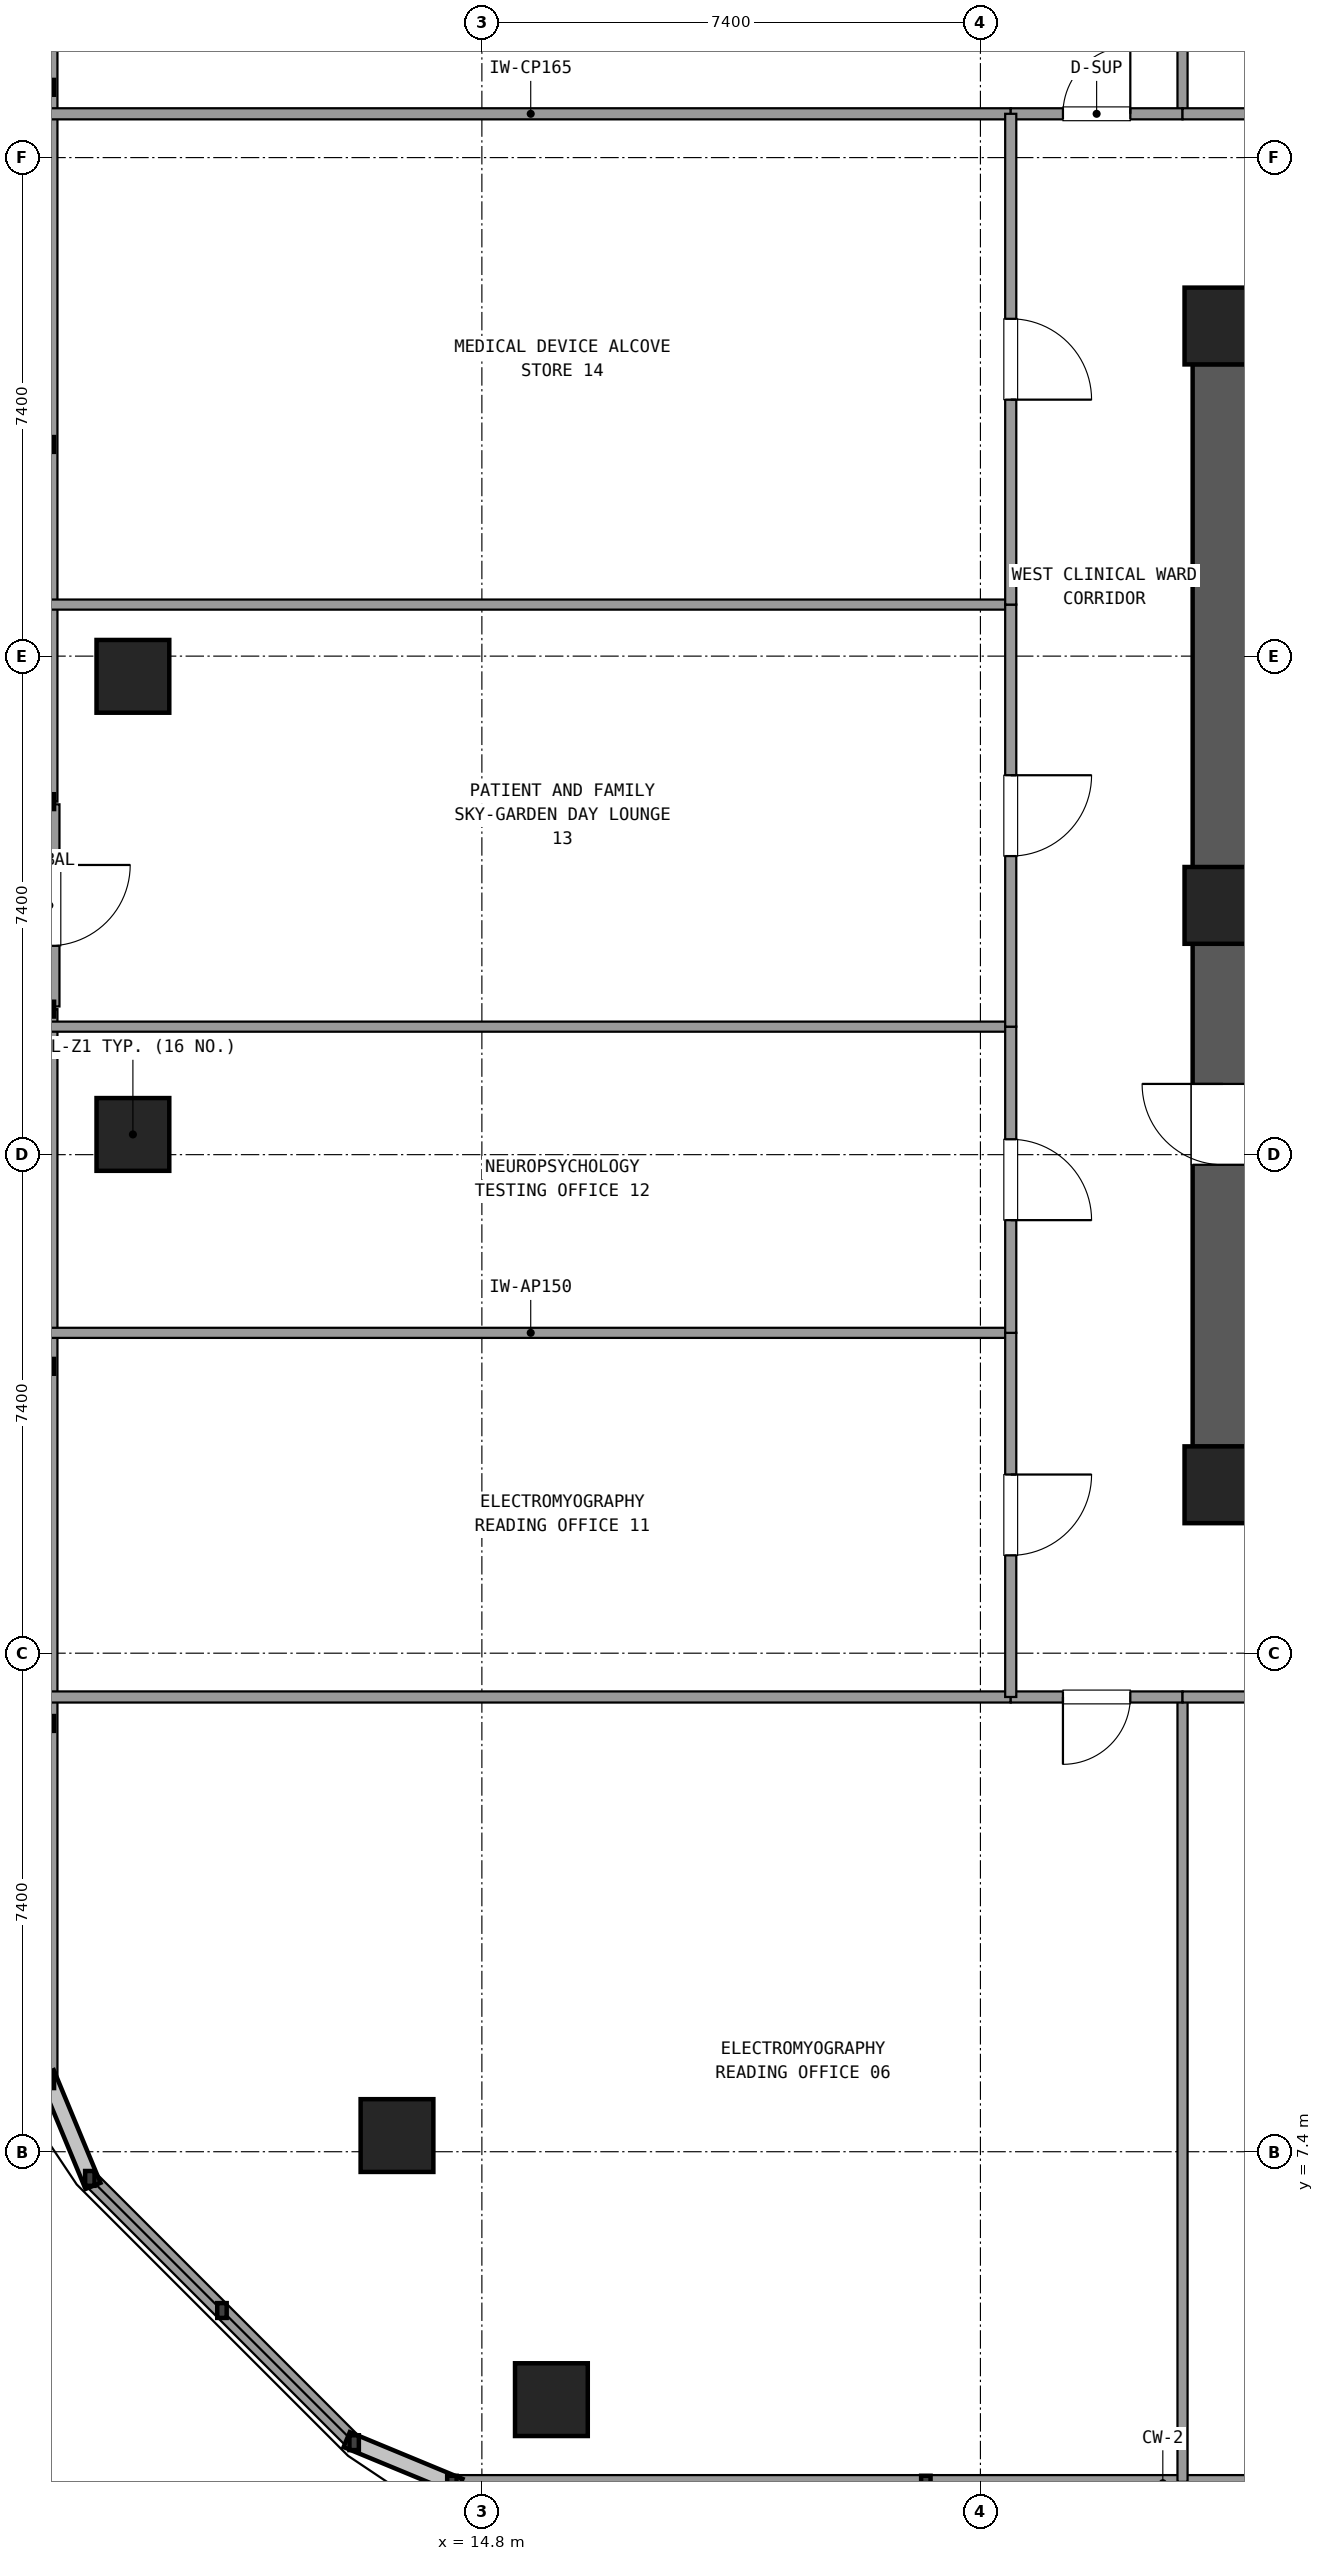
"""IFC4 building model, lengths in metres.
Left out: names, types, materials, properties, quantities, classifications, styles, units other than length and angle.
Written with IfcOpenShell. Run it as: python <this file> out.ifc"""

import sys

from ifc_helpers import new_model, si_unit, direction, frame, frame_2d, origin, origin_2d, place, context, subcontext, project, spatial, rectangle, extrude, element, fill, save


model = new_model("IFC4")
c1 = context("Model", 3, precision=1e-05, world=origin(), true_north=direction((0.0, 1.0)))
c2 = subcontext(c1, "Body", "Model", "MODEL_VIEW")
j1 = project(units=[si_unit("LENGTHUNIT", "METRE"), si_unit("PLANEANGLEUNIT", "RADIAN")], contexts=[c1])
p1 = place(None, origin())
s1 = spatial("IfcSite", under=j1, at=p1, CompositionType="ELEMENT")
p2 = place(p1, origin())
s2 = spatial("IfcBuilding", under=s1, at=p2, CompositionType="ELEMENT")
p3 = place(p2, frame((0.0, 0.0, 63.54)))
s3 = spatial("IfcBuildingStorey", under=s2, at=p3, CompositionType="ELEMENT", Elevation=63.54)
for number, where, z_axis, x_axis in (
    (1, (25.8, 17.3, 0.0), (0.0, 0.0, 1.0), (1.0, 0.0, 0.0)),
    (2, (25.8, 34.5, 0.0), (0.0, 0.0, 1.0), (1.0, 0.0, 0.0)),
    (3, (25.8, 25.9, 0.0), (0.0, 0.0, 1.0), (1.0, 0.0, 0.0)),
):
    element("IfcColumn", number, at=place(p3, frame(where, z_axis=z_axis, x_axis=x_axis)), inside=s3, PredefinedType="COLUMN", context=c2, shape_type="SweptSolid", body=[
        extrude(rectangle(XDim=1.14, YDim=1.14, at=origin_2d()), origin(), (0.0, 0.0, 1.0), 3.6),
    ])
p4 = place(p3, frame((25.8, 33.935, 0.0), z_axis=(0.0, 0.0, 1.0), x_axis=(0.0, -1.0, 0.0)))
e4 = element("IfcWall", 4, at=p4, inside=s3, PredefinedType="SHEAR", context=c2, shape_type="SweptSolid", body=[
    extrude(rectangle(XDim=7.47, YDim=0.9, at=frame_2d((3.735, 0.0))), origin(), (0.0, 0.0, 1.0), 3.32),
])
p5 = place(p3, frame((25.8, 25.335, 0.0), z_axis=(0.0, 0.0, 1.0), x_axis=(0.0, -1.0, 0.0)))
e5 = element("IfcWall", 5, at=p5, inside=s3, PredefinedType="SHEAR", context=c2, shape_type="SweptSolid", body=[
    extrude(rectangle(XDim=7.47, YDim=0.9, at=frame_2d((3.735, 0.0))), origin(), (0.0, 0.0, 1.0), 3.32),
])
p6 = place(p5, frame((2.085, 0.0, 0.0)))
e6 = element("IfcOpeningElement", 6, at=p6, cuts=e5, PredefinedType="OPENING", context=c2, shape_type="SweptSolid", body=[
    extrude(rectangle(XDim=1.2, YDim=2.15, at=frame_2d((0.6, 1.075))), frame((0.0, 0.46, 0.0), z_axis=(0.0, -1.0, 0.0), x_axis=(1.0, 0.0, 0.0)), (0.0, 0.0, 1.0), 0.92),
])
for number, where, z_axis, x_axis in (
    (7, (9.62, 22.5, 0.0), (0.0, 0.0, 1.0), (1.0, 0.0, 0.0)),
    (8, (13.54, 7.64, 0.0), (0.0, 0.0, 1.0), (1.0, 0.0, 0.0)),
    (9, (15.832, 3.72, 0.0), (0.0, 0.0, 1.0), (1.0, 0.0, 0.0)),
    (10, (9.62, 29.3, 0.0), (0.0, 0.0, 1.0), (1.0, 0.0, 0.0)),
):
    element("IfcColumn", number, at=place(p3, frame(where, z_axis=z_axis, x_axis=x_axis)), inside=s3, PredefinedType="COLUMN", context=c2, shape_type="SweptSolid", body=[
        extrude(rectangle(XDim=1.08, YDim=1.08, at=origin_2d()), origin(), (0.0, 0.0, 1.0), 3.6),
    ])
p7 = place(p3, frame((14.355, 2.48, 0.0), z_axis=(0.0, 0.0, 1.0), x_axis=(1.0, 0.0, 0.0)))
e11 = element("IfcWall", 11, at=p7, inside=s3, PredefinedType="SOLIDWALL", context=c2, shape_type="SweptSolid", body=[
    extrude(rectangle(XDim=21.105, YDim=0.24, at=frame_2d((10.552, 0.0))), origin(), (0.0, 0.0, 1.0), 0.85),
])
p8 = place(p3, frame((8.38, 27.4, 0.0), z_axis=(0.0, 0.0, 1.0), x_axis=(0.0, -1.0, 0.0)))
e12 = element("IfcWall", 12, at=p8, inside=s3, PredefinedType="SOLIDWALL", context=c2, shape_type="SweptSolid", body=[
    extrude(rectangle(XDim=3.0, YDim=0.3, at=frame_2d((1.5, 0.0))), origin(), (0.0, 0.0, 1.0), 2.65),
])
p9 = place(p8, frame((0.9, 0.0, 0.0)))
e13 = element("IfcOpeningElement", 13, at=p9, cuts=e12, PredefinedType="OPENING", context=c2, shape_type="SweptSolid", body=[
    extrude(rectangle(XDim=1.2, YDim=2.2, at=frame_2d((0.6, 1.1))), frame((0.0, 0.16, 0.0), z_axis=(0.0, -1.0, 0.0), x_axis=(1.0, 0.0, 0.0)), (0.0, 0.0, 1.0), 0.32),
])
for number, where, z_axis, x_axis in (
    (14, (8.38, 43.345, 0.0), (0.0, 0.0, 1.0), (0.0, -1.0, 0.0)),
    (15, (8.38, 24.36, 0.0), (0.0, 0.0, 1.0), (0.0, -1.0, 0.0)),
):
    element("IfcWall", number, at=place(p3, frame(where, z_axis=z_axis, x_axis=x_axis)), inside=s3, PredefinedType="SOLIDWALL", context=c2, shape_type="SweptSolid", body=[
        extrude(rectangle(XDim=15.905, YDim=0.24, at=frame_2d((7.953, 0.0))), origin(), (0.0, 0.0, 1.0), 0.85),
    ])
p10 = place(p3, frame((8.981, 7.004, 0.0), z_axis=(0.0, 0.0, 1.0), x_axis=(0.707128783731, -0.707084777957, 0.0)))
e16 = element("IfcWall", 16, at=p10, inside=s3, PredefinedType="SOLIDWALL", context=c2, shape_type="SweptSolid", body=[
    extrude(rectangle(XDim=5.548, YDim=0.24, at=frame_2d((2.774, 0.0))), origin(), (0.0, 0.0, 1.0), 0.85),
])
for number, where, z_axis, x_axis in (
    (17, (8.4, 37.65, 0.0), (0.0, 0.0, 1.0), (1.0, 0.0, 0.0)),
    (18, (8.4, 14.15, 0.0), (0.0, 0.0, 1.0), (1.0, 0.0, 0.0)),
):
    element("IfcWall", number, at=place(p3, frame(where, z_axis=z_axis, x_axis=x_axis)), inside=s3, PredefinedType="PARTITIONING", context=c2, shape_type="SweptSolid", body=[
        extrude(rectangle(XDim=14.25, YDim=0.165, at=frame_2d((7.125, 0.0))), origin(), (0.0, 0.0, 1.0), 2.61),
    ])
p11 = place(p3, frame((25.2, 37.65, 0.0), z_axis=(0.0, 0.0, 1.0), x_axis=(0.0, 1.0, 0.0)))
e19 = element("IfcWall", 19, at=p11, inside=s3, PredefinedType="PARTITIONING", context=c2, shape_type="SweptSolid", body=[
    extrude(rectangle(XDim=11.65, YDim=0.15, at=frame_2d((5.825, 0.0))), origin(), (0.0, 0.0, 1.0), 2.61),
])
p12 = place(p3, frame((22.65, 37.65, 0.0), z_axis=(0.0, 0.0, 1.0), x_axis=(1.0, 0.0, 0.0)))
e20 = element("IfcWall", 20, at=p12, inside=s3, PredefinedType="PARTITIONING", context=c2, shape_type="SweptSolid", body=[
    extrude(rectangle(XDim=2.55, YDim=0.165, at=frame_2d((1.275, 0.0))), origin(), (0.0, 0.0, 1.0), 2.61),
])
p13 = place(p12, frame((0.775, 0.0, 0.0)))
e21 = element("IfcOpeningElement", 21, at=p13, cuts=e20, PredefinedType="OPENING", context=c2, shape_type="SweptSolid", body=[
    extrude(rectangle(XDim=1.0, YDim=2.15, at=frame_2d((0.5, 1.075))), frame((0.0, 0.093, 0.0), z_axis=(0.0, -1.0, 0.0), x_axis=(1.0, 0.0, 0.0)), (0.0, 0.0, 1.0), 0.185),
])
p14 = place(p3, frame((25.2, 37.65, 0.0), z_axis=(0.0, 0.0, 1.0), x_axis=(1.0, 0.0, 0.0)))
e22 = element("IfcWall", 22, at=p14, inside=s3, PredefinedType="PARTITIONING", context=c2, shape_type="SweptSolid", body=[
    extrude(rectangle(XDim=7.751, YDim=0.165, at=frame_2d((3.875, 0.0))), origin(), (0.0, 0.0, 1.0), 2.61),
])
p15 = place(p14, frame((3.276, 0.0, 0.0)))
e23 = element("IfcOpeningElement", 23, at=p15, cuts=e22, PredefinedType="OPENING", context=c2, shape_type="SweptSolid", body=[
    extrude(rectangle(XDim=1.2, YDim=2.15, at=frame_2d((0.6, 1.075))), frame((0.0, 0.093, 0.0), z_axis=(0.0, -1.0, 0.0), x_axis=(1.0, 0.0, 0.0)), (0.0, 0.0, 1.0), 0.185),
])
p16 = place(p3, frame((25.2, 14.15, 0.0), z_axis=(0.0, 0.0, 1.0), x_axis=(0.0, -1.0, 0.0)))
e24 = element("IfcWall", 24, at=p16, inside=s3, PredefinedType="PARTITIONING", context=c2, shape_type="SweptSolid", body=[
    extrude(rectangle(XDim=11.65, YDim=0.15, at=frame_2d((5.825, 0.0))), origin(), (0.0, 0.0, 1.0), 2.61),
])
p17 = place(p3, frame((22.65, 14.15, 0.0), z_axis=(0.0, 0.0, 1.0), x_axis=(1.0, 0.0, 0.0)))
e25 = element("IfcWall", 25, at=p17, inside=s3, PredefinedType="PARTITIONING", context=c2, shape_type="SweptSolid", body=[
    extrude(rectangle(XDim=2.55, YDim=0.165, at=frame_2d((1.275, 0.0))), origin(), (0.0, 0.0, 1.0), 2.61),
])
p18 = place(p17, frame((0.775, 0.0, 0.0)))
e26 = element("IfcOpeningElement", 26, at=p18, cuts=e25, PredefinedType="OPENING", context=c2, shape_type="SweptSolid", body=[
    extrude(rectangle(XDim=1.0, YDim=2.15, at=frame_2d((0.5, 1.075))), frame((0.0, 0.093, 0.0), z_axis=(0.0, -1.0, 0.0), x_axis=(1.0, 0.0, 0.0)), (0.0, 0.0, 1.0), 0.185),
])
p19 = place(p3, frame((25.2, 14.15, 0.0), z_axis=(0.0, 0.0, 1.0), x_axis=(1.0, 0.0, 0.0)))
e27 = element("IfcWall", 27, at=p19, inside=s3, PredefinedType="PARTITIONING", context=c2, shape_type="SweptSolid", body=[
    extrude(rectangle(XDim=6.284, YDim=0.165, at=frame_2d((3.142, 0.0))), origin(), (0.0, 0.0, 1.0), 2.61),
])
p20 = place(p19, frame((2.542, 0.0, 0.0)))
e28 = element("IfcOpeningElement", 28, at=p20, cuts=e27, PredefinedType="OPENING", context=c2, shape_type="SweptSolid", body=[
    extrude(rectangle(XDim=1.2, YDim=2.15, at=frame_2d((0.6, 1.075))), frame((0.0, 0.093, 0.0), z_axis=(0.0, -1.0, 0.0), x_axis=(1.0, 0.0, 0.0)), (0.0, 0.0, 1.0), 0.185),
])
p21 = place(p3, frame((22.65, 19.555, 0.0), z_axis=(0.0, 0.0, 1.0), x_axis=(-1.0, 0.0, 0.0)))
e29 = element("IfcWall", 29, at=p21, inside=s3, PredefinedType="PARTITIONING", context=c2, shape_type="SweptSolid", body=[
    extrude(rectangle(XDim=14.25, YDim=0.15, at=frame_2d((7.125, 0.0))), origin(), (0.0, 0.0, 1.0), 2.61),
])
p22 = place(p3, frame((22.65, 14.15, 0.0), z_axis=(0.0, 0.0, 1.0), x_axis=(0.0, 1.0, 0.0)))
e30 = element("IfcWall", 30, at=p22, inside=s3, PredefinedType="PARTITIONING", context=c2, shape_type="SweptSolid", body=[
    extrude(rectangle(XDim=5.405, YDim=0.165, at=frame_2d((2.703, 0.0))), origin(), (0.0, 0.0, 1.0), 2.61),
])
p23 = place(p22, frame((2.102, 0.0, 0.0)))
e31 = element("IfcOpeningElement", 31, at=p23, cuts=e30, PredefinedType="OPENING", context=c2, shape_type="SweptSolid", body=[
    extrude(rectangle(XDim=1.2, YDim=2.15, at=frame_2d((0.6, 1.075))), frame((0.0, 0.093, 0.0), z_axis=(0.0, -1.0, 0.0), x_axis=(1.0, 0.0, 0.0)), (0.0, 0.0, 1.0), 0.185),
])
p24 = place(p3, frame((22.65, 24.1, 0.0), z_axis=(0.0, 0.0, 1.0), x_axis=(-1.0, 0.0, 0.0)))
e32 = element("IfcWall", 32, at=p24, inside=s3, PredefinedType="PARTITIONING", context=c2, shape_type="SweptSolid", body=[
    extrude(rectangle(XDim=14.25, YDim=0.15, at=frame_2d((7.125, 0.0))), origin(), (0.0, 0.0, 1.0), 2.61),
])
p25 = place(p3, frame((22.65, 19.555, 0.0), z_axis=(0.0, 0.0, 1.0), x_axis=(0.0, 1.0, 0.0)))
e33 = element("IfcWall", 33, at=p25, inside=s3, PredefinedType="PARTITIONING", context=c2, shape_type="SweptSolid", body=[
    extrude(rectangle(XDim=4.545, YDim=0.165, at=frame_2d((2.272, 0.0))), origin(), (0.0, 0.0, 1.0), 2.61),
])
p26 = place(p25, frame((1.673, 0.0, 0.0)))
e34 = element("IfcOpeningElement", 34, at=p26, cuts=e33, PredefinedType="OPENING", context=c2, shape_type="SweptSolid", body=[
    extrude(rectangle(XDim=1.2, YDim=2.15, at=frame_2d((0.6, 1.075))), frame((0.0, 0.093, 0.0), z_axis=(0.0, -1.0, 0.0), x_axis=(1.0, 0.0, 0.0)), (0.0, 0.0, 1.0), 0.185),
])
p27 = place(p3, frame((22.65, 30.365, 0.0), z_axis=(0.0, 0.0, 1.0), x_axis=(-1.0, 0.0, 0.0)))
e35 = element("IfcWall", 35, at=p27, inside=s3, PredefinedType="PARTITIONING", context=c2, shape_type="SweptSolid", body=[
    extrude(rectangle(XDim=14.25, YDim=0.15, at=frame_2d((7.125, 0.0))), origin(), (0.0, 0.0, 1.0), 2.61),
])
p28 = place(p3, frame((22.65, 24.1, 0.0), z_axis=(0.0, 0.0, 1.0), x_axis=(0.0, 1.0, 0.0)))
e36 = element("IfcWall", 36, at=p28, inside=s3, PredefinedType="PARTITIONING", context=c2, shape_type="SweptSolid", body=[
    extrude(rectangle(XDim=6.265, YDim=0.165, at=frame_2d((3.132, 0.0))), origin(), (0.0, 0.0, 1.0), 2.61),
])
p29 = place(p28, frame((2.532, 0.0, 0.0)))
e37 = element("IfcOpeningElement", 37, at=p29, cuts=e36, PredefinedType="OPENING", context=c2, shape_type="SweptSolid", body=[
    extrude(rectangle(XDim=1.2, YDim=2.15, at=frame_2d((0.6, 1.075))), frame((0.0, 0.093, 0.0), z_axis=(0.0, -1.0, 0.0), x_axis=(1.0, 0.0, 0.0)), (0.0, 0.0, 1.0), 0.185),
])
p30 = place(p3, frame((22.65, 30.365, 0.0), z_axis=(0.0, 0.0, 1.0), x_axis=(0.0, 1.0, 0.0)))
e38 = element("IfcWall", 38, at=p30, inside=s3, PredefinedType="PARTITIONING", context=c2, shape_type="SweptSolid", body=[
    extrude(rectangle(XDim=7.285, YDim=0.165, at=frame_2d((3.643, 0.0))), origin(), (0.0, 0.0, 1.0), 2.61),
])
p31 = place(p30, frame((3.042, 0.0, 0.0)))
e39 = element("IfcOpeningElement", 39, at=p31, cuts=e38, PredefinedType="OPENING", context=c2, shape_type="SweptSolid", body=[
    extrude(rectangle(XDim=1.2, YDim=2.15, at=frame_2d((0.6, 1.075))), frame((0.0, 0.093, 0.0), z_axis=(0.0, -1.0, 0.0), x_axis=(1.0, 0.0, 0.0)), (0.0, 0.0, 1.0), 0.185),
])
p32 = place(p6, frame((1.2, 0.0, 0.0), z_axis=(0.0, 0.0, 1.0), x_axis=(-1.0, 0.0, 0.0)))
e40 = element("IfcDoor", 40, at=p32, inside=s3, OperationType="SINGLE_SWING_LEFT", PredefinedType="DOOR", context=c2, shape_type="SweptSolid", body=[
    extrude(rectangle(XDim=1.2, YDim=2.15, at=frame_2d((0.6, 1.075))), frame((0.0, 0.025, 0.0), z_axis=(0.0, -1.0, 0.0), x_axis=(1.0, 0.0, 0.0)), (0.0, 0.0, 1.0), 0.05),
])
fill(e6, e40)
p33 = place(p13, origin())
e41 = element("IfcDoor", 41, at=p33, inside=s3, OperationType="SINGLE_SWING_RIGHT", PredefinedType="DOOR", context=c2, shape_type="SweptSolid", body=[
    extrude(rectangle(XDim=1.0, YDim=2.15, at=frame_2d((0.5, 1.075))), frame((0.0, 0.025, 0.0), z_axis=(0.0, -1.0, 0.0), x_axis=(1.0, 0.0, 0.0)), (0.0, 0.0, 1.0), 0.05),
])
fill(e21, e41)
p34 = place(p18, frame((1.0, 0.0, 0.0), z_axis=(0.0, 0.0, 1.0), x_axis=(-1.0, 0.0, 0.0)))
e42 = element("IfcDoor", 42, at=p34, inside=s3, OperationType="SINGLE_SWING_LEFT", PredefinedType="DOOR", context=c2, shape_type="SweptSolid", body=[
    extrude(rectangle(XDim=1.0, YDim=2.15, at=frame_2d((0.5, 1.075))), frame((0.0, 0.025, 0.0), z_axis=(0.0, -1.0, 0.0), x_axis=(1.0, 0.0, 0.0)), (0.0, 0.0, 1.0), 0.05),
])
fill(e26, e42)
p35 = place(p23, frame((1.2, 0.0, 0.0), z_axis=(0.0, 0.0, 1.0), x_axis=(-1.0, 0.0, 0.0)))
e43 = element("IfcDoor", 43, at=p35, inside=s3, OperationType="SINGLE_SWING_RIGHT", PredefinedType="DOOR", context=c2, shape_type="SweptSolid", body=[
    extrude(rectangle(XDim=1.2, YDim=2.15, at=frame_2d((0.6, 1.075))), frame((0.0, 0.025, 0.0), z_axis=(0.0, -1.0, 0.0), x_axis=(1.0, 0.0, 0.0)), (0.0, 0.0, 1.0), 0.05),
])
fill(e31, e43)
p36 = place(p26, frame((1.2, 0.0, 0.0), z_axis=(0.0, 0.0, 1.0), x_axis=(-1.0, 0.0, 0.0)))
e44 = element("IfcDoor", 44, at=p36, inside=s3, OperationType="SINGLE_SWING_LEFT", PredefinedType="DOOR", context=c2, shape_type="SweptSolid", body=[
    extrude(rectangle(XDim=1.2, YDim=2.15, at=frame_2d((0.6, 1.075))), frame((0.0, 0.025, 0.0), z_axis=(0.0, -1.0, 0.0), x_axis=(1.0, 0.0, 0.0)), (0.0, 0.0, 1.0), 0.05),
])
fill(e34, e44)
p37 = place(p29, frame((1.2, 0.0, 0.0), z_axis=(0.0, 0.0, 1.0), x_axis=(-1.0, 0.0, 0.0)))
e45 = element("IfcDoor", 45, at=p37, inside=s3, OperationType="SINGLE_SWING_RIGHT", PredefinedType="DOOR", context=c2, shape_type="SweptSolid", body=[
    extrude(rectangle(XDim=1.2, YDim=2.15, at=frame_2d((0.6, 1.075))), frame((0.0, 0.025, 0.0), z_axis=(0.0, -1.0, 0.0), x_axis=(1.0, 0.0, 0.0)), (0.0, 0.0, 1.0), 0.05),
])
fill(e37, e45)
p38 = place(p31, frame((1.2, 0.0, 0.0), z_axis=(0.0, 0.0, 1.0), x_axis=(-1.0, 0.0, 0.0)))
e46 = element("IfcDoor", 46, at=p38, inside=s3, OperationType="SINGLE_SWING_LEFT", PredefinedType="DOOR", context=c2, shape_type="SweptSolid", body=[
    extrude(rectangle(XDim=1.2, YDim=2.15, at=frame_2d((0.6, 1.075))), frame((0.0, 0.025, 0.0), z_axis=(0.0, -1.0, 0.0), x_axis=(1.0, 0.0, 0.0)), (0.0, 0.0, 1.0), 0.05),
])
fill(e39, e46)
save(model, sys.argv[1])
